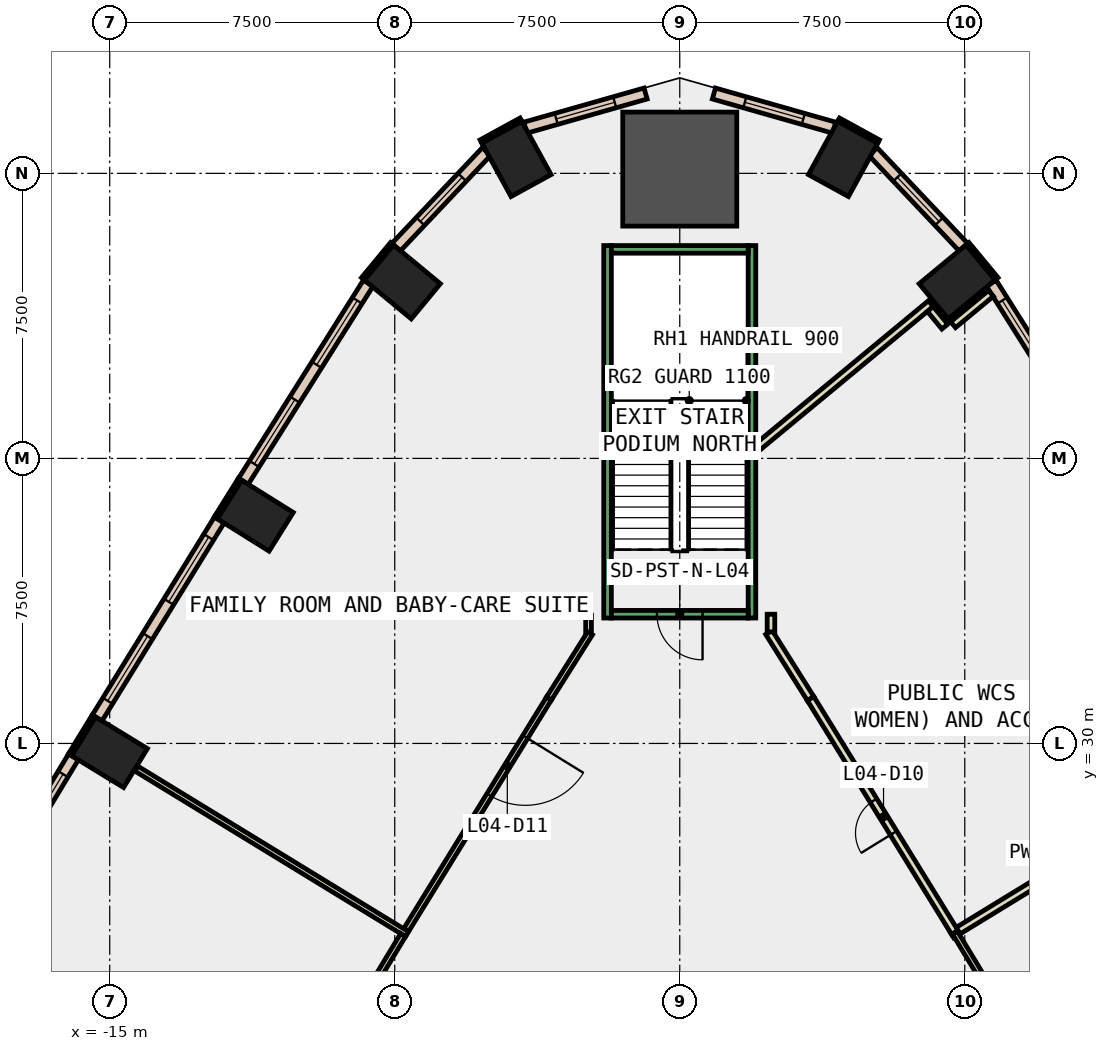
"""IFC4 building model, lengths in metres.
Left out: names, types, materials, properties, quantities, classifications, styles, units other than length and angle.
Written with IfcOpenShell. Run it as: python <this file> out.ifc"""

import sys

from ifc_helpers import new_model, si_unit, direction, frame, frame_2d, origin, origin_2d, place, context, subcontext, project, spatial, rectangle, extrude, element, fill, save


model = new_model("IFC4")
c1 = context("Model", 3, precision=1e-05, world=origin(), true_north=direction((0.0, 1.0)))
c2 = subcontext(c1, "Body", "Model", "MODEL_VIEW")
j1 = project(units=[si_unit("LENGTHUNIT", "METRE"), si_unit("PLANEANGLEUNIT", "RADIAN")], contexts=[c1])
p1 = place(None, origin())
s1 = spatial("IfcSite", under=j1, at=p1, CompositionType="ELEMENT")
p2 = place(p1, origin())
s2 = spatial("IfcBuilding", under=s1, at=p2, CompositionType="ELEMENT")
p3 = place(p2, frame((0.0, 0.0, 25.0)))
s3 = spatial("IfcBuildingStorey", under=s2, at=p3, CompositionType="ELEMENT", Elevation=25.0)
for number, where, z_axis, x_axis in (
    (1, (7.299, 42.144, -0.45), (0.0, 0.0, 1.0), (-0.638, 0.77, 0.0)),
    (2, (4.297, 45.38, -0.45), (0.0, 0.0, 1.0), (-0.877, 0.48, 0.0)),
):
    element("IfcColumn", number, at=place(p3, frame(where, z_axis=z_axis, x_axis=x_axis)), inside=s3, PredefinedType="COLUMN", context=c2, shape_type="SweptSolid", body=[
        extrude(rectangle(XDim=1.2, YDim=1.6, at=origin_2d()), origin(), (0.0, 0.0, 1.0), 5.0),
    ])
p4 = place(p3, frame((0.0, 45.112, -0.45), z_axis=(0.0, 0.0, 1.0), x_axis=(0.0, 1.0, 0.0)))
e3 = element("IfcColumn", 3, at=p4, inside=s3, PredefinedType="COLUMN", context=c2, shape_type="SweptSolid", body=[
    extrude(rectangle(XDim=3.0, YDim=3.0, at=origin_2d()), origin(), (0.0, 0.0, 1.0), 5.0),
])
for number, where, z_axis, x_axis in (
    (4, (-4.297, 45.38, -0.45), (0.0, 0.0, 1.0), (0.877, 0.48, 0.0)),
    (5, (-7.299, 42.144, -0.45), (0.0, 0.0, 1.0), (0.638, 0.77, 0.0)),
    (6, (-11.167, 35.993, -0.45), (0.0, 0.0, 1.0), (0.53, 0.848, 0.0)),
    (7, (-15.005, 29.769, -0.45), (0.0, 0.0, 1.0), (0.522, 0.853, 0.0)),
):
    element("IfcColumn", number, at=place(p3, frame(where, z_axis=z_axis, x_axis=x_axis)), inside=s3, PredefinedType="COLUMN", context=c2, shape_type="SweptSolid", body=[
        extrude(rectangle(XDim=1.2, YDim=1.6, at=origin_2d()), origin(), (0.0, 0.0, 1.0), 5.0),
    ])
for number, where, z_axis, x_axis in (
    (8, (5.231, 45.837, 0.0), (0.0, 0.0, 1.0), (-0.877, 0.48, 0.0)),
    (9, (-4.179, 46.413, 0.0), (0.0, 0.0, 1.0), (-0.877, -0.48, 0.0)),
    (10, (8.336, 42.224, 0.0), (0.0, 0.0, 1.0), (-0.638, 0.77, 0.0)),
    (11, (-7.571, 43.148, 0.0), (0.0, 0.0, 1.0), (-0.638, -0.77, 0.0)),
    (12, (-11.57, 36.952, 0.0), (0.0, 0.0, 1.0), (-0.53, -0.848, 0.0)),
):
    element("IfcWall", number, at=place(p3, frame(where, z_axis=z_axis, x_axis=x_axis)), inside=s3, PredefinedType="STANDARD", context=c2, shape_type="SweptSolid", body=[
        extrude(rectangle(XDim=1.199, YDim=0.1, at=frame_2d((0.6, 0.0))), origin(), (0.0, 0.0, 1.0), 4.55),
    ])
p5 = place(p3, frame((-15.417, 30.724, 0.0), z_axis=(0.0, 0.0, 1.0), x_axis=(-0.521507599072, -0.853246637327, 0.0)))
e13 = element("IfcWall", 13, at=p5, inside=s3, PredefinedType="STANDARD", context=c2, shape_type="SweptSolid", body=[
    extrude(rectangle(XDim=1.2, YDim=0.1, at=frame_2d((0.6, 0.0))), origin(), (0.0, 0.0, 1.0), 4.55),
])
p6 = place(p3, frame((11.483, 36.897, 0.0), z_axis=(0.0, 0.0, 1.0), x_axis=(-0.53304020879, 0.846089910006, 0.0)))
e14 = element("IfcWall", 14, at=p6, inside=s3, PredefinedType="STANDARD", context=c2, shape_type="SweptSolid", body=[
    extrude(rectangle(XDim=6.163, YDim=0.3, at=frame_2d((3.081, 0.0))), origin(), (0.0, 0.0, 1.0), 4.55),
])
p7 = place(p6, frame((0.541, 0.0, 1.0)))
e15 = element("IfcOpeningElement", 15, at=p7, cuts=e14, PredefinedType="OPENING", context=c2, shape_type="SweptSolid", body=[
    extrude(rectangle(XDim=2.0, YDim=3.2, at=frame_2d((1.0, 1.6))), frame((0.0, 0.16, 0.0), z_axis=(0.0, -1.0, 0.0), x_axis=(1.0, 0.0, 0.0)), (0.0, 0.0, 1.0), 0.32),
])
p8 = place(p6, frame((3.622, 0.0, 1.0)))
e16 = element("IfcOpeningElement", 16, at=p8, cuts=e14, PredefinedType="OPENING", context=c2, shape_type="SweptSolid", body=[
    extrude(rectangle(XDim=2.0, YDim=3.2, at=frame_2d((1.0, 1.6))), frame((0.0, 0.16, 0.0), z_axis=(0.0, -1.0, 0.0), x_axis=(1.0, 0.0, 0.0)), (0.0, 0.0, 1.0), 0.32),
])
p9 = place(p3, frame((7.464, 43.058, 0.0), z_axis=(0.0, 0.0, 1.0), x_axis=(-0.687081126245, 0.726580708495, 0.0)))
e17 = element("IfcWall", 17, at=p9, inside=s3, PredefinedType="STANDARD", context=c2, shape_type="SweptSolid", body=[
    extrude(rectangle(XDim=3.461, YDim=0.3, at=frame_2d((1.73, 0.0))), origin(), (0.0, 0.0, 1.0), 4.55),
])
p10 = place(p9, frame((0.931, 0.0, 1.0)))
e18 = element("IfcOpeningElement", 18, at=p10, cuts=e17, PredefinedType="OPENING", context=c2, shape_type="SweptSolid", body=[
    extrude(rectangle(XDim=1.6, YDim=3.2, at=frame_2d((0.8, 1.6))), frame((0.0, 0.16, 0.0), z_axis=(0.0, -1.0, 0.0), x_axis=(1.0, 0.0, 0.0)), (0.0, 0.0, 1.0), 0.32),
])
p11 = place(p3, frame((4.064, 46.202, 0.0), z_axis=(0.0, 0.0, 1.0), x_axis=(-0.961934470867, 0.273280211062, 0.0)))
e19 = element("IfcWall", 19, at=p11, inside=s3, PredefinedType="STANDARD", context=c2, shape_type="SweptSolid", body=[
    extrude(rectangle(XDim=3.29, YDim=0.3, at=frame_2d((1.645, 0.0))), origin(), (0.0, 0.0, 1.0), 4.55),
])
p12 = place(p11, frame((0.845, 0.0, 1.0)))
e20 = element("IfcOpeningElement", 20, at=p12, cuts=e19, PredefinedType="OPENING", context=c2, shape_type="SweptSolid", body=[
    extrude(rectangle(XDim=1.6, YDim=3.2, at=frame_2d((0.8, 1.6))), frame((0.0, 0.16, 0.0), z_axis=(0.0, -1.0, 0.0), x_axis=(1.0, 0.0, 0.0)), (0.0, 0.0, 1.0), 0.32),
])
p13 = place(p3, frame((-0.899, 47.101, 0.0), z_axis=(0.0, 0.0, 1.0), x_axis=(-0.961934470867, -0.273280211062, 0.0)))
e21 = element("IfcWall", 21, at=p13, inside=s3, PredefinedType="STANDARD", context=c2, shape_type="SweptSolid", body=[
    extrude(rectangle(XDim=3.29, YDim=0.3, at=frame_2d((1.645, 0.0))), origin(), (0.0, 0.0, 1.0), 4.55),
])
p14 = place(p13, frame((0.845, 0.0, 1.0)))
e22 = element("IfcOpeningElement", 22, at=p14, cuts=e21, PredefinedType="OPENING", context=c2, shape_type="SweptSolid", body=[
    extrude(rectangle(XDim=1.6, YDim=3.2, at=frame_2d((0.8, 1.6))), frame((0.0, 0.16, 0.0), z_axis=(0.0, -1.0, 0.0), x_axis=(1.0, 0.0, 0.0)), (0.0, 0.0, 1.0), 0.32),
])
p15 = place(p3, frame((-5.086, 45.573, 0.0), z_axis=(0.0, 0.0, 1.0), x_axis=(-0.687081126245, -0.726580708495, 0.0)))
e23 = element("IfcWall", 23, at=p15, inside=s3, PredefinedType="STANDARD", context=c2, shape_type="SweptSolid", body=[
    extrude(rectangle(XDim=3.461, YDim=0.3, at=frame_2d((1.73, 0.0))), origin(), (0.0, 0.0, 1.0), 4.55),
])
p16 = place(p15, frame((0.931, 0.0, 1.0)))
e24 = element("IfcOpeningElement", 24, at=p16, cuts=e23, PredefinedType="OPENING", context=c2, shape_type="SweptSolid", body=[
    extrude(rectangle(XDim=1.6, YDim=3.2, at=frame_2d((0.8, 1.6))), frame((0.0, 0.16, 0.0), z_axis=(0.0, -1.0, 0.0), x_axis=(1.0, 0.0, 0.0)), (0.0, 0.0, 1.0), 0.32),
])
p17 = place(p3, frame((-8.198, 42.111, 0.0), z_axis=(0.0, 0.0, 1.0), x_axis=(-0.53304020879, -0.846089910006, 0.0)))
e25 = element("IfcWall", 25, at=p17, inside=s3, PredefinedType="STANDARD", context=c2, shape_type="SweptSolid", body=[
    extrude(rectangle(XDim=6.163, YDim=0.3, at=frame_2d((3.081, 0.0))), origin(), (0.0, 0.0, 1.0), 4.55),
])
p18 = place(p17, frame((0.541, 0.0, 1.0)))
e26 = element("IfcOpeningElement", 26, at=p18, cuts=e25, PredefinedType="OPENING", context=c2, shape_type="SweptSolid", body=[
    extrude(rectangle(XDim=2.0, YDim=3.2, at=frame_2d((1.0, 1.6))), frame((0.0, 0.16, 0.0), z_axis=(0.0, -1.0, 0.0), x_axis=(1.0, 0.0, 0.0)), (0.0, 0.0, 1.0), 0.32),
])
p19 = place(p17, frame((3.622, 0.0, 1.0)))
e27 = element("IfcOpeningElement", 27, at=p19, cuts=e25, PredefinedType="OPENING", context=c2, shape_type="SweptSolid", body=[
    extrude(rectangle(XDim=2.0, YDim=3.2, at=frame_2d((1.0, 1.6))), frame((0.0, 0.16, 0.0), z_axis=(0.0, -1.0, 0.0), x_axis=(1.0, 0.0, 0.0)), (0.0, 0.0, 1.0), 0.32),
])
p20 = place(p3, frame((-12.117, 35.881, 0.0), z_axis=(0.0, 0.0, 1.0), x_axis=(-0.524953701886, -0.85113078365, 0.0)))
e28 = element("IfcWall", 28, at=p20, inside=s3, PredefinedType="STANDARD", context=c2, shape_type="SweptSolid", body=[
    extrude(rectangle(XDim=6.123, YDim=0.3, at=frame_2d((3.061, 0.0))), origin(), (0.0, 0.0, 1.0), 4.55),
])
p21 = place(p20, frame((0.531, 0.0, 1.0)))
e29 = element("IfcOpeningElement", 29, at=p21, cuts=e28, PredefinedType="OPENING", context=c2, shape_type="SweptSolid", body=[
    extrude(rectangle(XDim=2.0, YDim=3.2, at=frame_2d((1.0, 1.6))), frame((0.0, 0.16, 0.0), z_axis=(0.0, -1.0, 0.0), x_axis=(1.0, 0.0, 0.0)), (0.0, 0.0, 1.0), 0.32),
])
p22 = place(p20, frame((3.592, 0.0, 1.0)))
e30 = element("IfcOpeningElement", 30, at=p22, cuts=e28, PredefinedType="OPENING", context=c2, shape_type="SweptSolid", body=[
    extrude(rectangle(XDim=2.0, YDim=3.2, at=frame_2d((1.0, 1.6))), frame((0.0, 0.16, 0.0), z_axis=(0.0, -1.0, 0.0), x_axis=(1.0, 0.0, 0.0)), (0.0, 0.0, 1.0), 0.32),
])
p23 = place(p3, frame((-15.954, 29.647, 0.0), z_axis=(0.0, 0.0, 1.0), x_axis=(-0.516687651362, -0.85617397235, 0.0)))
e31 = element("IfcWall", 31, at=p23, inside=s3, PredefinedType="STANDARD", context=c2, shape_type="SweptSolid", body=[
    extrude(rectangle(XDim=6.121, YDim=0.3, at=frame_2d((3.061, 0.0))), origin(), (0.0, 0.0, 1.0), 4.55),
])
p24 = place(p23, frame((0.53, 0.0, 1.0)))
e32 = element("IfcOpeningElement", 32, at=p24, cuts=e31, PredefinedType="OPENING", context=c2, shape_type="SweptSolid", body=[
    extrude(rectangle(XDim=2.0, YDim=3.2, at=frame_2d((1.0, 1.6))), frame((0.0, 0.16, 0.0), z_axis=(0.0, -1.0, 0.0), x_axis=(1.0, 0.0, 0.0)), (0.0, 0.0, 1.0), 0.32),
])
p25 = place(p23, frame((3.591, 0.0, 1.0)))
e33 = element("IfcOpeningElement", 33, at=p25, cuts=e31, PredefinedType="OPENING", context=c2, shape_type="SweptSolid", body=[
    extrude(rectangle(XDim=2.0, YDim=3.2, at=frame_2d((1.0, 1.6))), frame((0.0, 0.16, 0.0), z_axis=(0.0, -1.0, 0.0), x_axis=(1.0, 0.0, 0.0)), (0.0, 0.0, 1.0), 0.32),
])
p26 = place(p3, frame((7.156, 24.97, 0.0), z_axis=(0.0, 0.0, 1.0), x_axis=(0.853189087451, 0.52160174564, 0.0)))
e34 = element("IfcWall", 34, at=p26, inside=s3, PredefinedType="PARTITIONING", context=c2, shape_type="SweptSolid", body=[
    extrude(rectangle(XDim=8.2, YDim=0.2, at=frame_2d((4.1, 0.0))), origin(), (0.0, 0.0, 1.0), 4.55),
])
p27 = place(p3, frame((10.968, 18.845, 0.0), z_axis=(0.0, 0.0, 1.0), x_axis=(-0.516619201563, 0.856215277005, 0.0)))
e35 = element("IfcWall", 35, at=p27, inside=s3, PredefinedType="PARTITIONING", context=c2, shape_type="SweptSolid", body=[
    extrude(rectangle(XDim=7.214, YDim=0.15, at=frame_2d((3.607, 0.0))), origin(), (0.0, 0.0, 1.0), 4.55),
])
p28 = place(p27, frame((0.534, 0.0, 0.0)))
e36 = element("IfcOpeningElement", 36, at=p28, cuts=e35, PredefinedType="OPENING", context=c2, shape_type="SweptSolid", body=[
    extrude(rectangle(XDim=1.0, YDim=2.1, at=frame_2d((0.5, 1.05))), frame((0.0, 0.085, 0.0), z_axis=(0.0, -1.0, 0.0), x_axis=(1.0, 0.0, 0.0)), (0.0, 0.0, 1.0), 0.17),
])
p29 = place(p3, frame((2.0, 37.758, 0.0), z_axis=(0.0, 0.0, 1.0), x_axis=(0.7702988792, 0.637683022122, 0.0)))
e37 = element("IfcWall", 37, at=p29, inside=s3, PredefinedType="PARTITIONING", context=c2, shape_type="SweptSolid", body=[
    extrude(rectangle(XDim=5.979, YDim=0.2, at=frame_2d((2.99, 0.0))), origin(), (0.0, 0.0, 1.0), 4.55),
])
p30 = place(p3, frame((6.593, 41.43, 0.0), z_axis=(0.0, 0.0, 1.0), x_axis=(0.636576557089, -0.771213515808, 0.0)))
e38 = element("IfcWall", 38, at=p30, inside=s3, PredefinedType="PARTITIONING", context=c2, shape_type="SweptSolid", body=[
    extrude(rectangle(XDim=0.6, YDim=0.2, at=frame_2d((0.3, 0.0))), origin(), (0.0, 0.0, 1.0), 4.55),
])
p31 = place(p3, frame((7.193, 41.018, 0.0), z_axis=(0.0, 0.0, 1.0), x_axis=(0.77046149962, 0.637486531311, 0.0)))
e39 = element("IfcWall", 39, at=p31, inside=s3, PredefinedType="PARTITIONING", context=c2, shape_type="SweptSolid", body=[
    extrude(rectangle(XDim=1.292, YDim=0.2, at=frame_2d((0.646, 0.0))), origin(), (0.0, 0.0, 1.0), 4.55),
])
p32 = place(p3, frame((3.444, 31.179, 0.0), z_axis=(0.0, 0.0, 1.0), x_axis=(-0.53294851268, 0.846147672001, 0.0)))
e40 = element("IfcWall", 40, at=p32, inside=s3, PredefinedType="PARTITIONING", context=c2, shape_type="SweptSolid", body=[
    extrude(rectangle(XDim=2.059, YDim=0.2, at=frame_2d((1.029, 0.0))), origin(), (0.0, 0.0, 1.0), 4.55),
])
p33 = place(p3, frame((2.4, 32.936, 0.0), z_axis=(0.0, 0.0, 1.0), x_axis=(0.0, 1.0, 0.0)))
e41 = element("IfcWall", 41, at=p33, inside=s3, PredefinedType="PARTITIONING", context=c2, shape_type="SweptSolid", body=[
    extrude(rectangle(XDim=0.464, YDim=0.2, at=frame_2d((0.232, 0.0))), origin(), (0.0, 0.0, 1.0), 4.55),
])
p34 = place(p3, frame((7.236, 25.03, 0.0), z_axis=(0.0, 0.0, 1.0), x_axis=(-0.524904209579, 0.851161307137, 0.0)))
e42 = element("IfcWall", 42, at=p34, inside=s3, PredefinedType="PARTITIONING", context=c2, shape_type="SweptSolid", body=[
    extrude(rectangle(XDim=7.224, YDim=0.2, at=frame_2d((3.612, 0.0))), origin(), (0.0, 0.0, 1.0), 4.55),
])
p35 = place(p34, frame((3.07, 0.0, 0.0)))
e43 = element("IfcOpeningElement", 43, at=p35, cuts=e42, PredefinedType="OPENING", context=c2, shape_type="SweptSolid", body=[
    extrude(rectangle(XDim=1.0, YDim=2.1, at=frame_2d((0.5, 1.05))), frame((0.0, 0.11, 0.0), z_axis=(0.0, -1.0, 0.0), x_axis=(1.0, 0.0, 0.0)), (0.0, 0.0, 1.0), 0.22),
])
p36 = place(p3, frame((-7.177, 24.983, 0.0), z_axis=(0.0, 0.0, 1.0), x_axis=(-0.85316479293, 0.521641482347, 0.0)))
e44 = element("IfcWall", 44, at=p36, inside=s3, PredefinedType="PARTITIONING", context=c2, shape_type="SweptSolid", body=[
    extrude(rectangle(XDim=8.355, YDim=0.15, at=frame_2d((4.177, 0.0))), origin(), (0.0, 0.0, 1.0), 4.55),
])
p37 = place(p3, frame((-2.4, 33.375, 0.0), z_axis=(0.0, 0.0, 1.0), x_axis=(0.0, -1.0, 0.0)))
e45 = element("IfcWall", 45, at=p37, inside=s3, PredefinedType="PARTITIONING", context=c2, shape_type="SweptSolid", body=[
    extrude(rectangle(XDim=0.464, YDim=0.15, at=frame_2d((0.232, 0.0))), origin(), (0.0, 0.0, 1.0), 4.55),
])
p38 = place(p3, frame((-2.36, 32.899, 0.0), z_axis=(0.0, 0.0, 1.0), x_axis=(-0.533179492261, -0.846002144815, 0.0)))
e46 = element("IfcWall", 46, at=p38, inside=s3, PredefinedType="PARTITIONING", context=c2, shape_type="SweptSolid", body=[
    extrude(rectangle(XDim=2.033, YDim=0.15, at=frame_2d((1.017, 0.0))), origin(), (0.0, 0.0, 1.0), 4.55),
])
p39 = place(p3, frame((-3.444, 31.179, 0.0), z_axis=(0.0, 0.0, 1.0), x_axis=(-0.52494313189, -0.851137302838, 0.0)))
e47 = element("IfcWall", 47, at=p39, inside=s3, PredefinedType="PARTITIONING", context=c2, shape_type="SweptSolid", body=[
    extrude(rectangle(XDim=7.149, YDim=0.15, at=frame_2d((3.575, 0.0))), origin(), (0.0, 0.0, 1.0), 4.55),
])
p40 = place(p39, frame((1.184, 0.0, 0.0)))
e48 = element("IfcOpeningElement", 48, at=p40, cuts=e47, PredefinedType="OPENING", context=c2, shape_type="SweptSolid", body=[
    extrude(rectangle(XDim=1.8, YDim=2.1, at=frame_2d((0.9, 1.05))), frame((0.0, 0.085, 0.0), z_axis=(0.0, -1.0, 0.0), x_axis=(1.0, 0.0, 0.0)), (0.0, 0.0, 1.0), 0.17),
])
p41 = place(p3, frame((-7.28, 24.958, 0.0), z_axis=(0.0, 0.0, 1.0), x_axis=(-0.516571176119, -0.856244252538, 0.0)))
e49 = element("IfcWall", 49, at=p41, inside=s3, PredefinedType="PARTITIONING", context=c2, shape_type="SweptSolid", body=[
    extrude(rectangle(XDim=7.139, YDim=0.15, at=frame_2d((3.57, 0.0))), origin(), (0.0, 0.0, 1.0), 4.55),
])
for number, where, z_axis, x_axis in (
    (50, (1.9, 33.3, 0.0), (0.0, 0.0, 1.0), (0.0, 1.0, 0.0)),
    (51, (-1.9, 33.3, 0.0), (0.0, 0.0, 1.0), (0.0, 1.0, 0.0)),
):
    element("IfcWall", number, at=place(p3, frame(where, z_axis=z_axis, x_axis=x_axis)), inside=s3, PredefinedType="STANDARD", context=c2, shape_type="SweptSolid", body=[
        extrude(rectangle(XDim=9.8, YDim=0.2, at=frame_2d((4.9, 0.0))), origin(), (0.0, 0.0, 1.0), 4.55),
    ])
p42 = place(p3, frame((1.8, 33.4, 0.0), z_axis=(0.0, 0.0, 1.0), x_axis=(-1.0, 0.0, 0.0)))
e52 = element("IfcWall", 52, at=p42, inside=s3, PredefinedType="STANDARD", context=c2, shape_type="SweptSolid", body=[
    extrude(rectangle(XDim=3.6, YDim=0.2, at=frame_2d((1.8, 0.0))), origin(), (0.0, 0.0, 1.0), 4.55),
])
p43 = place(p42, frame((1.2, 0.0, 0.0)))
e53 = element("IfcOpeningElement", 53, at=p43, cuts=e52, PredefinedType="OPENING", context=c2, shape_type="SweptSolid", body=[
    extrude(rectangle(XDim=1.2, YDim=2.2, at=frame_2d((0.6, 1.1))), frame((0.0, 0.11, 0.0), z_axis=(0.0, -1.0, 0.0), x_axis=(1.0, 0.0, 0.0)), (0.0, 0.0, 1.0), 0.22),
])
p44 = place(p3, frame((1.8, 43.0, 0.0), z_axis=(0.0, 0.0, 1.0), x_axis=(-1.0, 0.0, 0.0)))
e54 = element("IfcWall", 54, at=p44, inside=s3, PredefinedType="STANDARD", context=c2, shape_type="SweptSolid", body=[
    extrude(rectangle(XDim=3.6, YDim=0.2, at=frame_2d((1.8, 0.0))), origin(), (0.0, 0.0, 1.0), 4.55),
])
p45 = place(p8, origin())
e55 = element("IfcWindow", 55, at=p45, inside=s3, PartitioningType="SINGLE_PANEL", PredefinedType="WINDOW", context=c2, shape_type="SweptSolid", body=[
    extrude(rectangle(XDim=2.0, YDim=3.2, at=frame_2d((1.0, 1.6))), frame((0.0, 0.03, 0.0), z_axis=(0.0, -1.0, 0.0), x_axis=(1.0, 0.0, 0.0)), (0.0, 0.0, 1.0), 0.06),
])
fill(e16, e55)
p46 = place(p10, origin())
e56 = element("IfcWindow", 56, at=p46, inside=s3, PartitioningType="SINGLE_PANEL", PredefinedType="WINDOW", context=c2, shape_type="SweptSolid", body=[
    extrude(rectangle(XDim=1.6, YDim=3.2, at=frame_2d((0.8, 1.6))), frame((0.0, 0.03, 0.0), z_axis=(0.0, -1.0, 0.0), x_axis=(1.0, 0.0, 0.0)), (0.0, 0.0, 1.0), 0.06),
])
fill(e18, e56)
p47 = place(p12, origin())
e57 = element("IfcWindow", 57, at=p47, inside=s3, PartitioningType="SINGLE_PANEL", PredefinedType="WINDOW", context=c2, shape_type="SweptSolid", body=[
    extrude(rectangle(XDim=1.6, YDim=3.2, at=frame_2d((0.8, 1.6))), frame((0.0, 0.03, 0.0), z_axis=(0.0, -1.0, 0.0), x_axis=(1.0, 0.0, 0.0)), (0.0, 0.0, 1.0), 0.06),
])
fill(e20, e57)
p48 = place(p14, origin())
e58 = element("IfcWindow", 58, at=p48, inside=s3, PartitioningType="SINGLE_PANEL", PredefinedType="WINDOW", context=c2, shape_type="SweptSolid", body=[
    extrude(rectangle(XDim=1.6, YDim=3.2, at=frame_2d((0.8, 1.6))), frame((0.0, 0.03, 0.0), z_axis=(0.0, -1.0, 0.0), x_axis=(1.0, 0.0, 0.0)), (0.0, 0.0, 1.0), 0.06),
])
fill(e22, e58)
p49 = place(p16, origin())
e59 = element("IfcWindow", 59, at=p49, inside=s3, PartitioningType="SINGLE_PANEL", PredefinedType="WINDOW", context=c2, shape_type="SweptSolid", body=[
    extrude(rectangle(XDim=1.6, YDim=3.2, at=frame_2d((0.8, 1.6))), frame((0.0, 0.03, 0.0), z_axis=(0.0, -1.0, 0.0), x_axis=(1.0, 0.0, 0.0)), (0.0, 0.0, 1.0), 0.06),
])
fill(e24, e59)
p50 = place(p18, origin())
e60 = element("IfcWindow", 60, at=p50, inside=s3, PartitioningType="SINGLE_PANEL", PredefinedType="WINDOW", context=c2, shape_type="SweptSolid", body=[
    extrude(rectangle(XDim=2.0, YDim=3.2, at=frame_2d((1.0, 1.6))), frame((0.0, 0.03, 0.0), z_axis=(0.0, -1.0, 0.0), x_axis=(1.0, 0.0, 0.0)), (0.0, 0.0, 1.0), 0.06),
])
fill(e26, e60)
p51 = place(p19, origin())
e61 = element("IfcWindow", 61, at=p51, inside=s3, PartitioningType="SINGLE_PANEL", PredefinedType="WINDOW", context=c2, shape_type="SweptSolid", body=[
    extrude(rectangle(XDim=2.0, YDim=3.2, at=frame_2d((1.0, 1.6))), frame((0.0, 0.03, 0.0), z_axis=(0.0, -1.0, 0.0), x_axis=(1.0, 0.0, 0.0)), (0.0, 0.0, 1.0), 0.06),
])
fill(e27, e61)
p52 = place(p21, origin())
e62 = element("IfcWindow", 62, at=p52, inside=s3, PartitioningType="SINGLE_PANEL", PredefinedType="WINDOW", context=c2, shape_type="SweptSolid", body=[
    extrude(rectangle(XDim=2.0, YDim=3.2, at=frame_2d((1.0, 1.6))), frame((0.0, 0.03, 0.0), z_axis=(0.0, -1.0, 0.0), x_axis=(1.0, 0.0, 0.0)), (0.0, 0.0, 1.0), 0.06),
])
fill(e29, e62)
p53 = place(p22, origin())
e63 = element("IfcWindow", 63, at=p53, inside=s3, PartitioningType="SINGLE_PANEL", PredefinedType="WINDOW", context=c2, shape_type="SweptSolid", body=[
    extrude(rectangle(XDim=2.0, YDim=3.2, at=frame_2d((1.0, 1.6))), frame((0.0, 0.03, 0.0), z_axis=(0.0, -1.0, 0.0), x_axis=(1.0, 0.0, 0.0)), (0.0, 0.0, 1.0), 0.06),
])
fill(e30, e63)
p54 = place(p24, origin())
e64 = element("IfcWindow", 64, at=p54, inside=s3, PartitioningType="SINGLE_PANEL", PredefinedType="WINDOW", context=c2, shape_type="SweptSolid", body=[
    extrude(rectangle(XDim=2.0, YDim=3.2, at=frame_2d((1.0, 1.6))), frame((0.0, 0.03, 0.0), z_axis=(0.0, -1.0, 0.0), x_axis=(1.0, 0.0, 0.0)), (0.0, 0.0, 1.0), 0.06),
])
fill(e32, e64)
p55 = place(p35, origin())
e65 = element("IfcDoor", 65, at=p55, inside=s3, OperationType="SINGLE_SWING_RIGHT", PredefinedType="DOOR", context=c2, shape_type="SweptSolid", body=[
    extrude(rectangle(XDim=1.0, YDim=2.1, at=frame_2d((0.5, 1.05))), frame((0.0, 0.025, 0.0), z_axis=(0.0, -1.0, 0.0), x_axis=(1.0, 0.0, 0.0)), (0.0, 0.0, 1.0), 0.05),
])
fill(e43, e65)
p56 = place(p40, origin())
e66 = element("IfcDoor", 66, at=p56, inside=s3, OperationType="DOUBLE_DOOR_SINGLE_SWING", PredefinedType="DOOR", context=c2, shape_type="SweptSolid", body=[
    extrude(rectangle(XDim=1.8, YDim=2.1, at=frame_2d((0.9, 1.05))), frame((0.0, 0.025, 0.0), z_axis=(0.0, -1.0, 0.0), x_axis=(1.0, 0.0, 0.0)), (0.0, 0.0, 1.0), 0.05),
])
fill(e48, e66)
p57 = place(p43, origin())
e67 = element("IfcDoor", 67, at=p57, inside=s3, OperationType="SINGLE_SWING_LEFT", PredefinedType="DOOR", context=c2, shape_type="SweptSolid", body=[
    extrude(rectangle(XDim=1.2, YDim=2.2, at=frame_2d((0.6, 1.1))), frame((0.0, 0.025, 0.0), z_axis=(0.0, -1.0, 0.0), x_axis=(1.0, 0.0, 0.0)), (0.0, 0.0, 1.0), 0.05),
])
fill(e53, e67)
save(model, sys.argv[1])
